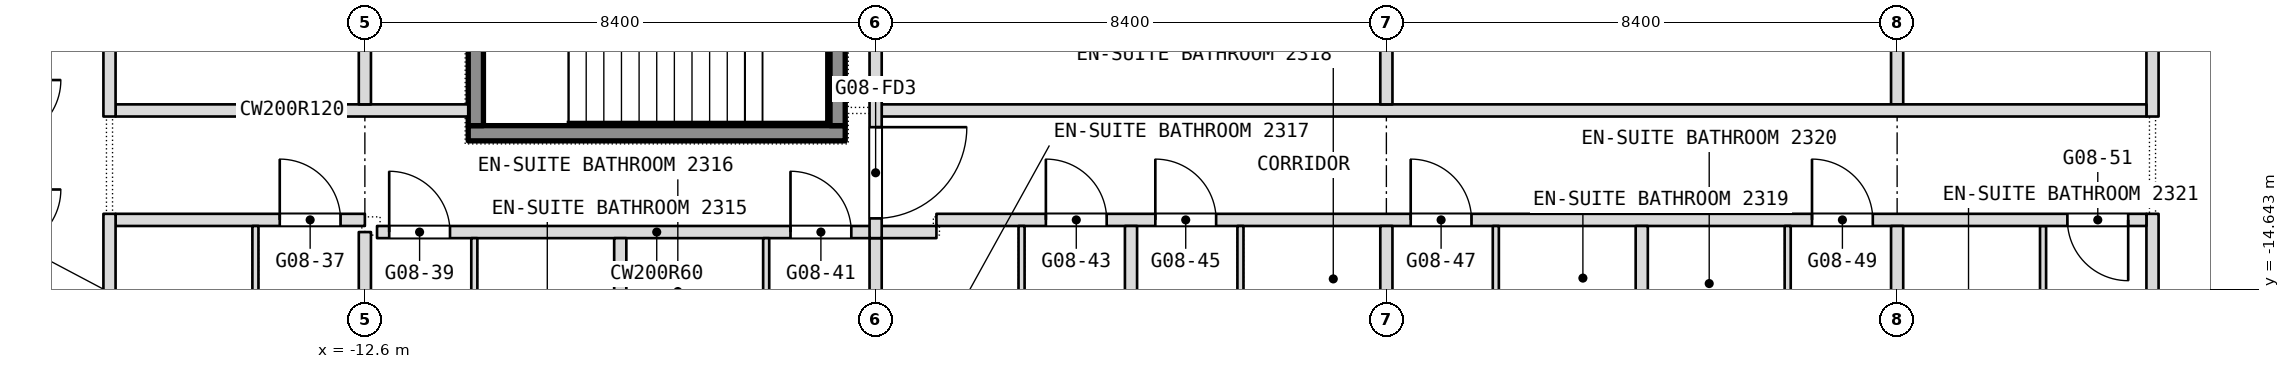
"""IFC4 building model, lengths in metres.
Left out: names, types, materials, properties, quantities, classifications, styles, units other than length and angle.
Written with IfcOpenShell. Run it as: python <this file> out.ifc"""

import sys

from ifc_helpers import new_model, si_unit, direction, frame, frame_2d, origin, place, context, subcontext, project, spatial, rectangle, extrude, element, fill, save


model = new_model("IFC4")
c1 = context("Model", 3, precision=1e-05, world=origin(), true_north=direction((0.0, 1.0)))
c2 = subcontext(c1, "Body", "Model", "MODEL_VIEW")
j1 = project(units=[si_unit("LENGTHUNIT", "METRE"), si_unit("PLANEANGLEUNIT", "RADIAN")], contexts=[c1])
p1 = place(None, origin())
s1 = spatial("IfcSite", under=j1, at=p1, CompositionType="ELEMENT")
p2 = place(p1, origin())
s2 = spatial("IfcBuilding", under=s1, at=p2, CompositionType="ELEMENT")
p3 = place(p2, frame((0.0, 0.0, 108.5)))
s3 = spatial("IfcBuildingStorey", under=s2, at=p3, CompositionType="ELEMENT", Elevation=108.5)
p4 = place(p3, frame((16.8, -22.186, 0.0), z_axis=(0.0, 0.0, 1.0), x_axis=(0.0, 1.0, 0.0)))
e1 = element("IfcWall", 1, at=p4, inside=s3, PredefinedType="PARTITIONING", context=c2, shape_type="SweptSolid", body=[
    extrude(rectangle(XDim=8.786, YDim=0.2, at=frame_2d((4.393, 0.0))), origin(), (0.0, 0.0, 1.0), 3.34),
])
p5 = place(p3, frame((16.8, -11.8, 0.0), z_axis=(0.0, 0.0, 1.0), x_axis=(0.0, 1.0, 0.0)))
e2 = element("IfcWall", 2, at=p5, inside=s3, PredefinedType="PARTITIONING", context=c2, shape_type="SweptSolid", body=[
    extrude(rectangle(XDim=9.9, YDim=0.2, at=frame_2d((4.95, 0.0))), origin(), (0.0, 0.0, 1.0), 3.34),
])
p6 = place(p3, frame((15.0, -16.85, 0.0), z_axis=(0.0, 0.0, 1.0), x_axis=(0.0, 1.0, 0.0)))
e3 = element("IfcWall", 3, at=p6, inside=s3, PredefinedType="PARTITIONING", context=c2, shape_type="SweptSolid", body=[
    extrude(rectangle(XDim=3.25, YDim=0.1, at=frame_2d((1.625, 0.0))), origin(), (0.0, 0.0, 1.0), 3.34),
])
p7 = place(p3, frame((-12.4, -13.7, 0.0), z_axis=(0.0, 0.0, 1.0), x_axis=(1.0, 0.0, 0.0)))
e4 = element("IfcWall", 4, at=p7, inside=s3, PredefinedType="PARTITIONING", context=c2, shape_type="SweptSolid", body=[
    extrude(rectangle(XDim=9.2, YDim=0.2, at=frame_2d((4.6, 0.0))), origin(), (0.0, 0.0, 1.0), 3.34),
])
p8 = place(p7, frame((0.2, 0.0, 0.0)))
e5 = element("IfcOpeningElement", 5, at=p8, cuts=e4, PredefinedType="OPENING", context=c2, shape_type="SweptSolid", body=[
    extrude(rectangle(XDim=1.0, YDim=2.1, at=frame_2d((0.5, 1.05))), frame((0.0, 0.1, 0.0), z_axis=(0.0, -1.0, 0.0), x_axis=(1.0, 0.0, 0.0)), (0.0, 0.0, 1.0), 0.2),
])
p9 = place(p7, frame((6.8, 0.0, 0.0)))
e6 = element("IfcOpeningElement", 6, at=p9, cuts=e4, PredefinedType="OPENING", context=c2, shape_type="SweptSolid", body=[
    extrude(rectangle(XDim=1.0, YDim=2.1, at=frame_2d((0.5, 1.05))), frame((0.0, 0.1, 0.0), z_axis=(0.0, -1.0, 0.0), x_axis=(1.0, 0.0, 0.0)), (0.0, 0.0, 1.0), 0.2),
])
p10 = place(p3, frame((-16.7, -13.5, 0.0), z_axis=(0.0, 0.0, 1.0), x_axis=(1.0, 0.0, 0.0)))
e7 = element("IfcWall", 7, at=p10, inside=s3, PredefinedType="PARTITIONING", context=c2, shape_type="SweptSolid", body=[
    extrude(rectangle(XDim=4.1, YDim=0.2, at=frame_2d((2.05, 0.0))), origin(), (0.0, 0.0, 1.0), 3.34),
])
p11 = place(p10, frame((2.7, 0.0, 0.0)))
e8 = element("IfcOpeningElement", 8, at=p11, cuts=e7, PredefinedType="OPENING", context=c2, shape_type="SweptSolid", body=[
    extrude(rectangle(XDim=1.0, YDim=2.1, at=frame_2d((0.5, 1.05))), frame((0.0, 0.1, 0.0), z_axis=(0.0, -1.0, 0.0), x_axis=(1.0, 0.0, 0.0)), (0.0, 0.0, 1.0), 0.2),
])
p12 = place(p3, frame((-3.2, -13.5, 0.0), z_axis=(0.0, 0.0, 1.0), x_axis=(1.0, 0.0, 0.0)))
e9 = element("IfcWall", 9, at=p12, inside=s3, PredefinedType="PARTITIONING", context=c2, shape_type="SweptSolid", body=[
    extrude(rectangle(XDim=19.9, YDim=0.2, at=frame_2d((9.95, 0.0))), origin(), (0.0, 0.0, 1.0), 3.34),
])
p13 = place(p12, frame((1.8, 0.0, 0.0)))
e10 = element("IfcOpeningElement", 10, at=p13, cuts=e9, PredefinedType="OPENING", context=c2, shape_type="SweptSolid", body=[
    extrude(rectangle(XDim=1.0, YDim=2.1, at=frame_2d((0.5, 1.05))), frame((0.0, 0.1, 0.0), z_axis=(0.0, -1.0, 0.0), x_axis=(1.0, 0.0, 0.0)), (0.0, 0.0, 1.0), 0.2),
])
p14 = place(p12, frame((3.6, 0.0, 0.0)))
e11 = element("IfcOpeningElement", 11, at=p14, cuts=e9, PredefinedType="OPENING", context=c2, shape_type="SweptSolid", body=[
    extrude(rectangle(XDim=1.0, YDim=2.1, at=frame_2d((0.5, 1.05))), frame((0.0, 0.1, 0.0), z_axis=(0.0, -1.0, 0.0), x_axis=(1.0, 0.0, 0.0)), (0.0, 0.0, 1.0), 0.2),
])
p15 = place(p12, frame((7.8, 0.0, 0.0)))
e12 = element("IfcOpeningElement", 12, at=p15, cuts=e9, PredefinedType="OPENING", context=c2, shape_type="SweptSolid", body=[
    extrude(rectangle(XDim=1.0, YDim=2.1, at=frame_2d((0.5, 1.05))), frame((0.0, 0.1, 0.0), z_axis=(0.0, -1.0, 0.0), x_axis=(1.0, 0.0, 0.0)), (0.0, 0.0, 1.0), 0.2),
])
p16 = place(p12, frame((14.4, 0.0, 0.0)))
e13 = element("IfcOpeningElement", 13, at=p16, cuts=e9, PredefinedType="OPENING", context=c2, shape_type="SweptSolid", body=[
    extrude(rectangle(XDim=1.0, YDim=2.1, at=frame_2d((0.5, 1.05))), frame((0.0, 0.1, 0.0), z_axis=(0.0, -1.0, 0.0), x_axis=(1.0, 0.0, 0.0)), (0.0, 0.0, 1.0), 0.2),
])
p17 = place(p12, frame((18.6, 0.0, 0.0)))
e14 = element("IfcOpeningElement", 14, at=p17, cuts=e9, PredefinedType="OPENING", context=c2, shape_type="SweptSolid", body=[
    extrude(rectangle(XDim=1.0, YDim=2.1, at=frame_2d((0.5, 1.05))), frame((0.0, 0.1, 0.0), z_axis=(0.0, -1.0, 0.0), x_axis=(1.0, 0.0, 0.0)), (0.0, 0.0, 1.0), 0.2),
])
p18 = place(p3, frame((12.6, -21.175, 0.0), z_axis=(0.0, 0.0, 1.0), x_axis=(0.0, 1.0, 0.0)))
e15 = element("IfcWall", 15, at=p18, inside=s3, PredefinedType="PARTITIONING", context=c2, shape_type="SweptSolid", body=[
    extrude(rectangle(XDim=7.575, YDim=0.2, at=frame_2d((3.788, 0.0))), origin(), (0.0, 0.0, 1.0), 3.34),
])
p19 = place(p3, frame((12.6, -11.6, 0.0), z_axis=(0.0, 0.0, 1.0), x_axis=(0.0, 1.0, 0.0)))
e16 = element("IfcWall", 16, at=p19, inside=s3, PredefinedType="PARTITIONING", context=c2, shape_type="SweptSolid", body=[
    extrude(rectangle(XDim=3.9, YDim=0.2, at=frame_2d((1.95, 0.0))), origin(), (0.0, 0.0, 1.0), 3.34),
])
p20 = place(p3, frame((-16.7, -11.7, 0.0), z_axis=(0.0, 0.0, 1.0), x_axis=(1.0, 0.0, 0.0)))
e17 = element("IfcWall", 17, at=p20, inside=s3, PredefinedType="PARTITIONING", context=c2, shape_type="SweptSolid", body=[
    extrude(rectangle(XDim=5.8, YDim=0.2, at=frame_2d((2.9, 0.0))), origin(), (0.0, 0.0, 1.0), 3.34),
])
p21 = place(p3, frame((-4.1, -11.7, 0.0), z_axis=(0.0, 0.0, 1.0), x_axis=(1.0, 0.0, 0.0)))
e18 = element("IfcWall", 18, at=p21, inside=s3, PredefinedType="PARTITIONING", context=c2, shape_type="SweptSolid", body=[
    extrude(rectangle(XDim=20.8, YDim=0.2, at=frame_2d((10.4, 0.0))), origin(), (0.0, 0.0, 1.0), 3.34),
])
p22 = place(p3, frame((10.8, -16.45, 0.0), z_axis=(0.0, 0.0, 1.0), x_axis=(0.0, 1.0, 0.0)))
e19 = element("IfcWall", 19, at=p22, inside=s3, PredefinedType="PARTITIONING", context=c2, shape_type="SweptSolid", body=[
    extrude(rectangle(XDim=2.85, YDim=0.1, at=frame_2d((1.425, 0.0))), origin(), (0.0, 0.0, 1.0), 3.34),
])
p23 = place(p3, frame((8.4, -23.3, 0.0), z_axis=(0.0, 0.0, 1.0), x_axis=(0.0, 1.0, 0.0)))
e20 = element("IfcWall", 20, at=p23, inside=s3, PredefinedType="PARTITIONING", context=c2, shape_type="SweptSolid", body=[
    extrude(rectangle(XDim=9.7, YDim=0.2, at=frame_2d((4.85, 0.0))), origin(), (0.0, 0.0, 1.0), 3.34),
])
p24 = place(p3, frame((6.0, -16.35, 0.0), z_axis=(0.0, 0.0, 1.0), x_axis=(0.0, 1.0, 0.0)))
e21 = element("IfcWall", 21, at=p24, inside=s3, PredefinedType="PARTITIONING", context=c2, shape_type="SweptSolid", body=[
    extrude(rectangle(XDim=2.75, YDim=0.1, at=frame_2d((1.375, 0.0))), origin(), (0.0, 0.0, 1.0), 3.34),
])
p25 = place(p3, frame((4.2, -23.3, 0.0), z_axis=(0.0, 0.0, 1.0), x_axis=(0.0, 1.0, 0.0)))
e22 = element("IfcWall", 22, at=p25, inside=s3, PredefinedType="PARTITIONING", context=c2, shape_type="SweptSolid", body=[
    extrude(rectangle(XDim=9.7, YDim=0.2, at=frame_2d((4.85, 0.0))), origin(), (0.0, 0.0, 1.0), 3.34),
])
p26 = place(p3, frame((4.2, -11.6, 0.0), z_axis=(0.0, 0.0, 1.0), x_axis=(0.0, 1.0, 0.0)))
e23 = element("IfcWall", 23, at=p26, inside=s3, PredefinedType="PARTITIONING", context=c2, shape_type="SweptSolid", body=[
    extrude(rectangle(XDim=9.7, YDim=0.2, at=frame_2d((4.85, 0.0))), origin(), (0.0, 0.0, 1.0), 3.34),
])
p27 = place(p3, frame((1.8, -17.45, 0.0), z_axis=(0.0, 0.0, 1.0), x_axis=(0.0, 1.0, 0.0)))
e24 = element("IfcWall", 24, at=p27, inside=s3, PredefinedType="PARTITIONING", context=c2, shape_type="SweptSolid", body=[
    extrude(rectangle(XDim=3.85, YDim=0.1, at=frame_2d((1.925, 0.0))), origin(), (0.0, 0.0, 1.0), 3.34),
])
p28 = place(p27, frame((1.355, 0.0, 0.0)))
e25 = element("IfcOpeningElement", 25, at=p28, cuts=e24, PredefinedType="OPENING", context=c2, shape_type="SweptSolid", body=[
    extrude(rectangle(XDim=0.9, YDim=2.1, at=frame_2d((0.45, 1.05))), frame((0.0, 0.05, 0.0), z_axis=(0.0, -1.0, 0.0), x_axis=(1.0, 0.0, 0.0)), (0.0, 0.0, 1.0), 0.1),
])
p29 = place(p3, frame((0.0, -23.3, 0.0), z_axis=(0.0, 0.0, 1.0), x_axis=(0.0, 1.0, 0.0)))
e26 = element("IfcWall", 26, at=p29, inside=s3, PredefinedType="PARTITIONING", context=c2, shape_type="SweptSolid", body=[
    extrude(rectangle(XDim=9.7, YDim=0.2, at=frame_2d((4.85, 0.0))), origin(), (0.0, 0.0, 1.0), 3.34),
])
p30 = place(p3, frame((-1.8, -17.35, 0.0), z_axis=(0.0, 0.0, 1.0), x_axis=(0.0, 1.0, 0.0)))
e27 = element("IfcWall", 27, at=p30, inside=s3, PredefinedType="PARTITIONING", context=c2, shape_type="SweptSolid", body=[
    extrude(rectangle(XDim=3.75, YDim=0.1, at=frame_2d((1.875, 0.0))), origin(), (0.0, 0.0, 1.0), 3.34),
])
p31 = place(p3, frame((-4.2, -23.3, 0.0), z_axis=(0.0, 0.0, 1.0), x_axis=(0.0, 1.0, 0.0)))
e28 = element("IfcWall", 28, at=p31, inside=s3, PredefinedType="PARTITIONING", context=c2, shape_type="SweptSolid", body=[
    extrude(rectangle(XDim=9.5, YDim=0.2, at=frame_2d((4.75, 0.0))), origin(), (0.0, 0.0, 1.0), 3.34),
])
p32 = place(p3, frame((-4.2, -13.8, 0.0), z_axis=(0.0, 0.0, 1.0), x_axis=(0.0, 1.0, 0.0)))
e29 = element("IfcWall", 29, at=p32, inside=s3, PredefinedType="PARTITIONING", context=c2, shape_type="SweptSolid", body=[
    extrude(rectangle(XDim=13.8, YDim=0.2, at=frame_2d((6.9, 0.0))), origin(), (0.0, 0.0, 1.0), 3.34),
])
p33 = place(p32, frame((12.15, 0.0, 0.0)))
e30 = element("IfcOpeningElement", 30, at=p33, cuts=e29, PredefinedType="OPENING", context=c2, shape_type="SweptSolid", body=[
    extrude(rectangle(XDim=1.5, YDim=2.1, at=frame_2d((0.75, 1.05))), frame((0.0, 0.1, 0.0), z_axis=(0.0, -1.0, 0.0), x_axis=(1.0, 0.0, 0.0)), (0.0, 0.0, 1.0), 0.2),
])
p34 = place(p32, frame((0.325, 0.0, 0.0)))
e31 = element("IfcOpeningElement", 31, at=p34, cuts=e29, PredefinedType="OPENING", context=c2, shape_type="SweptSolid", body=[
    extrude(rectangle(XDim=1.5, YDim=2.1, at=frame_2d((0.75, 1.05))), frame((0.0, 0.1, 0.0), z_axis=(0.0, -1.0, 0.0), x_axis=(1.0, 0.0, 0.0)), (0.0, 0.0, 1.0), 0.2),
])
p35 = place(p3, frame((-6.0, -16.45, 0.0), z_axis=(0.0, 0.0, 1.0), x_axis=(0.0, 1.0, 0.0)))
e32 = element("IfcWall", 32, at=p35, inside=s3, PredefinedType="PARTITIONING", context=c2, shape_type="SweptSolid", body=[
    extrude(rectangle(XDim=2.65, YDim=0.1, at=frame_2d((1.325, 0.0))), origin(), (0.0, 0.0, 1.0), 3.34),
])
p36 = place(p3, frame((-8.4, -23.3, 0.0), z_axis=(0.0, 0.0, 1.0), x_axis=(0.0, 1.0, 0.0)))
e33 = element("IfcWall", 33, at=p36, inside=s3, PredefinedType="PARTITIONING", context=c2, shape_type="SweptSolid", body=[
    extrude(rectangle(XDim=9.5, YDim=0.2, at=frame_2d((4.75, 0.0))), origin(), (0.0, 0.0, 1.0), 3.34),
])
p37 = place(p3, frame((-10.8, -17.65, 0.0), z_axis=(0.0, 0.0, 1.0), x_axis=(0.0, 1.0, 0.0)))
e34 = element("IfcWall", 34, at=p37, inside=s3, PredefinedType="PARTITIONING", context=c2, shape_type="SweptSolid", body=[
    extrude(rectangle(XDim=3.85, YDim=0.1, at=frame_2d((1.925, 0.0))), origin(), (0.0, 0.0, 1.0), 3.34),
])
p38 = place(p3, frame((-12.6, -21.175, 0.0), z_axis=(0.0, 0.0, 1.0), x_axis=(0.0, 1.0, 0.0)))
e35 = element("IfcWall", 35, at=p38, inside=s3, PredefinedType="PARTITIONING", context=c2, shape_type="SweptSolid", body=[
    extrude(rectangle(XDim=7.475, YDim=0.2, at=frame_2d((3.738, 0.0))), origin(), (0.0, 0.0, 1.0), 3.34),
])
p39 = place(p3, frame((-12.6, -11.6, 0.0), z_axis=(0.0, 0.0, 1.0), x_axis=(0.0, 1.0, 0.0)))
e36 = element("IfcWall", 36, at=p39, inside=s3, PredefinedType="PARTITIONING", context=c2, shape_type="SweptSolid", body=[
    extrude(rectangle(XDim=9.7, YDim=0.2, at=frame_2d((4.85, 0.0))), origin(), (0.0, 0.0, 1.0), 3.34),
])
p40 = place(p3, frame((-14.4, -17.65, 0.0), z_axis=(0.0, 0.0, 1.0), x_axis=(0.0, 1.0, 0.0)))
e37 = element("IfcWall", 37, at=p40, inside=s3, PredefinedType="PARTITIONING", context=c2, shape_type="SweptSolid", body=[
    extrude(rectangle(XDim=4.05, YDim=0.1, at=frame_2d((2.025, 0.0))), origin(), (0.0, 0.0, 1.0), 3.34),
])
p41 = place(p3, frame((-16.8, -22.186, 0.0), z_axis=(0.0, 0.0, 1.0), x_axis=(0.0, 1.0, 0.0)))
e38 = element("IfcWall", 38, at=p41, inside=s3, PredefinedType="PARTITIONING", context=c2, shape_type="SweptSolid", body=[
    extrude(rectangle(XDim=8.786, YDim=0.2, at=frame_2d((4.393, 0.0))), origin(), (0.0, 0.0, 1.0), 3.34),
])
p42 = place(p3, frame((-16.8, -11.8, 0.0), z_axis=(0.0, 0.0, 1.0), x_axis=(0.0, 1.0, 0.0)))
e39 = element("IfcWall", 39, at=p42, inside=s3, PredefinedType="PARTITIONING", context=c2, shape_type="SweptSolid", body=[
    extrude(rectangle(XDim=9.9, YDim=0.2, at=frame_2d((4.95, 0.0))), origin(), (0.0, 0.0, 1.0), 3.34),
])
p43 = place(p3, frame((-10.9, -12.075, 0.1), z_axis=(0.0, 0.0, 1.0), x_axis=(1.0, 0.0, 0.0)))
e40 = element("IfcWall", 40, at=p43, inside=s3, PredefinedType="SHEAR", context=c2, shape_type="SweptSolid", body=[
    extrude(rectangle(XDim=6.2, YDim=0.25, at=frame_2d((3.1, 0.0))), origin(), (0.0, 0.0, 1.0), 3.6),
])
for number, where, z_axis, x_axis in (
    (41, (-10.775, -11.95, 0.1), (0.0, 0.0, 1.0), (0.0, 1.0, 0.0)),
    (42, (-4.825, -11.95, 0.1), (0.0, 0.0, 1.0), (0.0, 1.0, 0.0)),
):
    element("IfcWall", number, at=place(p3, frame(where, z_axis=z_axis, x_axis=x_axis)), inside=s3, PredefinedType="SHEAR", context=c2, shape_type="SweptSolid", body=[
        extrude(rectangle(XDim=2.9, YDim=0.25, at=frame_2d((1.45, 0.0))), origin(), (0.0, 0.0, 1.0), 3.6),
    ])
p44 = place(p8, origin())
e43 = element("IfcDoor", 43, at=p44, inside=s3, OperationType="SINGLE_SWING_RIGHT", PredefinedType="DOOR", context=c2, shape_type="SweptSolid", body=[
    extrude(rectangle(XDim=1.0, YDim=2.1, at=frame_2d((0.5, 1.05))), frame((0.0, 0.025, 0.0), z_axis=(0.0, -1.0, 0.0), x_axis=(1.0, 0.0, 0.0)), (0.0, 0.0, 1.0), 0.05),
])
fill(e5, e43)
p45 = place(p9, origin())
e44 = element("IfcDoor", 44, at=p45, inside=s3, OperationType="SINGLE_SWING_LEFT", PredefinedType="DOOR", context=c2, shape_type="SweptSolid", body=[
    extrude(rectangle(XDim=1.0, YDim=2.1, at=frame_2d((0.5, 1.05))), frame((0.0, 0.025, 0.0), z_axis=(0.0, -1.0, 0.0), x_axis=(1.0, 0.0, 0.0)), (0.0, 0.0, 1.0), 0.05),
])
fill(e6, e44)
p46 = place(p11, origin())
e45 = element("IfcDoor", 45, at=p46, inside=s3, OperationType="SINGLE_SWING_LEFT", PredefinedType="DOOR", context=c2, shape_type="SweptSolid", body=[
    extrude(rectangle(XDim=1.0, YDim=2.1, at=frame_2d((0.5, 1.05))), frame((0.0, 0.025, 0.0), z_axis=(0.0, -1.0, 0.0), x_axis=(1.0, 0.0, 0.0)), (0.0, 0.0, 1.0), 0.05),
])
fill(e8, e45)
p47 = place(p13, origin())
e46 = element("IfcDoor", 46, at=p47, inside=s3, OperationType="SINGLE_SWING_LEFT", PredefinedType="DOOR", context=c2, shape_type="SweptSolid", body=[
    extrude(rectangle(XDim=1.0, YDim=2.1, at=frame_2d((0.5, 1.05))), frame((0.0, 0.025, 0.0), z_axis=(0.0, -1.0, 0.0), x_axis=(1.0, 0.0, 0.0)), (0.0, 0.0, 1.0), 0.05),
])
fill(e10, e46)
p48 = place(p14, origin())
e47 = element("IfcDoor", 47, at=p48, inside=s3, OperationType="SINGLE_SWING_LEFT", PredefinedType="DOOR", context=c2, shape_type="SweptSolid", body=[
    extrude(rectangle(XDim=1.0, YDim=2.1, at=frame_2d((0.5, 1.05))), frame((0.0, 0.025, 0.0), z_axis=(0.0, -1.0, 0.0), x_axis=(1.0, 0.0, 0.0)), (0.0, 0.0, 1.0), 0.05),
])
fill(e11, e47)
p49 = place(p15, origin())
e48 = element("IfcDoor", 48, at=p49, inside=s3, OperationType="SINGLE_SWING_LEFT", PredefinedType="DOOR", context=c2, shape_type="SweptSolid", body=[
    extrude(rectangle(XDim=1.0, YDim=2.1, at=frame_2d((0.5, 1.05))), frame((0.0, 0.025, 0.0), z_axis=(0.0, -1.0, 0.0), x_axis=(1.0, 0.0, 0.0)), (0.0, 0.0, 1.0), 0.05),
])
fill(e12, e48)
p50 = place(p16, origin())
e49 = element("IfcDoor", 49, at=p50, inside=s3, OperationType="SINGLE_SWING_LEFT", PredefinedType="DOOR", context=c2, shape_type="SweptSolid", body=[
    extrude(rectangle(XDim=1.0, YDim=2.1, at=frame_2d((0.5, 1.05))), frame((0.0, 0.025, 0.0), z_axis=(0.0, -1.0, 0.0), x_axis=(1.0, 0.0, 0.0)), (0.0, 0.0, 1.0), 0.05),
])
fill(e13, e49)
p51 = place(p17, origin())
e50 = element("IfcDoor", 50, at=p51, inside=s3, OperationType="SINGLE_SWING_LEFT", PredefinedType="DOOR", context=c2, shape_type="SweptSolid", body=[
    extrude(rectangle(XDim=1.0, YDim=2.1, at=frame_2d((0.5, 1.05))), frame((0.0, 0.025, 0.0), z_axis=(0.0, -1.0, 0.0), x_axis=(1.0, 0.0, 0.0)), (0.0, 0.0, 1.0), 0.05),
])
fill(e14, e50)
p52 = place(p34, origin())
e51 = element("IfcDoor", 51, at=p52, inside=s3, OperationType="DOUBLE_DOOR_DOUBLE_SWING", PredefinedType="DOOR", context=c2, shape_type="SweptSolid", body=[
    extrude(rectangle(XDim=1.5, YDim=2.1, at=frame_2d((0.75, 1.05))), frame((0.0, 0.025, 0.0), z_axis=(0.0, -1.0, 0.0), x_axis=(1.0, 0.0, 0.0)), (0.0, 0.0, 1.0), 0.05),
])
fill(e31, e51)
save(model, sys.argv[1])
